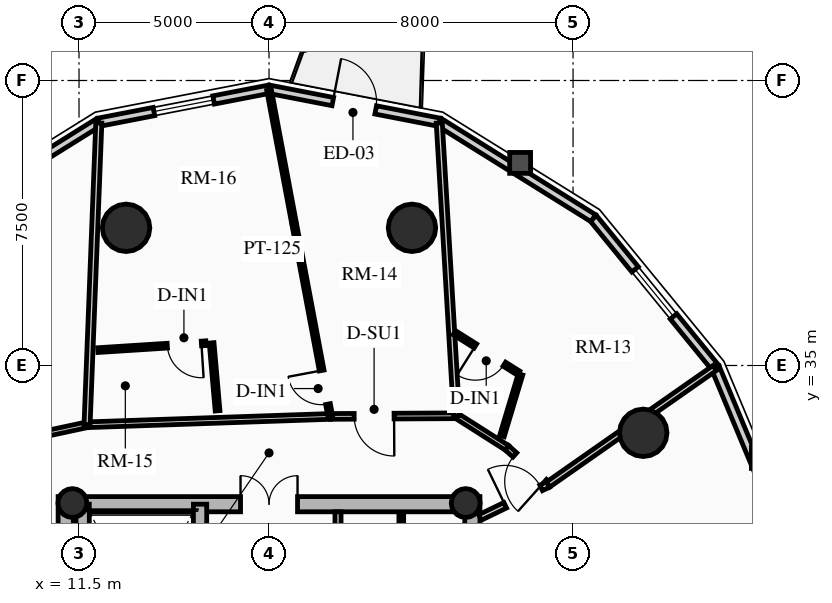
"""IFC4 building model, lengths in metres.
Left out: names, types, materials, properties, quantities, classifications, styles, units other than length and angle.
Written with IfcOpenShell. Run it as: python <this file> out.ifc"""

import sys

from ifc_helpers import new_model, si_unit, direction, frame, frame_2d, origin, origin_2d, place, context, subcontext, project, spatial, rectangle, circle, hollow_circle, extrude, source, transform, mapped, element, fill, save


model = new_model("IFC4")
c1 = context("Model", 3, precision=1e-05, world=origin(), true_north=direction((0.0, 1.0)))
c2 = subcontext(c1, "Body", "Model", "MODEL_VIEW")
j1 = project(units=[si_unit("LENGTHUNIT", "METRE"), si_unit("PLANEANGLEUNIT", "RADIAN")], contexts=[c1])
p1 = place(None, origin())
s1 = spatial("IfcSite", under=j1, at=p1, CompositionType="ELEMENT")
p2 = place(p1, origin())
s2 = spatial("IfcBuilding", under=s1, at=p2, CompositionType="ELEMENT")
p3 = place(p2, frame((0.0, 0.0, 154.51)))
s3 = spatial("IfcBuildingStorey", under=s2, at=p3, CompositionType="ELEMENT", Elevation=154.51)
for number, where, z_axis, x_axis in (
    (1, (11.15, 17.45, 0.0), (0.0, 0.0, 1.0), (0.0, 1.0, 0.0)),
    (2, (21.85, 17.45, 0.0), (0.0, 0.0, 1.0), (0.0, 1.0, 0.0)),
):
    element("IfcWall", number, at=place(p3, frame(where, z_axis=z_axis, x_axis=x_axis)), inside=s3, PredefinedType="SHEAR", context=c2, shape_type="SweptSolid", body=[
        extrude(rectangle(XDim=14.1, YDim=0.4, at=frame_2d((7.05, 0.0))), origin(), (0.0, 0.0, 1.0), 2.91),
    ])
p4 = place(p3, frame((11.15, 31.35, 0.0), z_axis=(0.0, 0.0, 1.0), x_axis=(1.0, 0.0, 0.0)))
e3 = element("IfcWall", 3, at=p4, inside=s3, PredefinedType="SHEAR", context=c2, shape_type="SweptSolid", body=[
    extrude(rectangle(XDim=10.7, YDim=0.4, at=frame_2d((5.35, 0.0))), origin(), (0.0, 0.0, 1.0), 2.91),
])
m1 = source(origin(), c2, "Body", "SweptSolid", [
    extrude(rectangle(XDim=1.5, YDim=2.02, at=frame_2d((0.75, 1.01))), frame((0.0, 0.21, 0.0), z_axis=(0.0, -1.0, 0.0), x_axis=(1.0, 0.0, 0.0)), (0.0, 0.0, 1.0), 0.42),
])
p5 = place(p4, frame((4.6, 0.0, 0.0)))
e4 = element("IfcOpeningElement", 4, at=p5, cuts=e3, PredefinedType="OPENING", context=c2, shape_type="MappedRepresentation", body=[
    mapped(m1, transform((0.0, 0.0, 0.0), x_axis=(1.0, 0.0, 0.0), y_axis=(0.0, 1.0, 0.0), z_axis=(0.0, 0.0, 1.0), scale=1.0)),
])
p6 = place(p3, frame((14.685, 17.65, 0.0), z_axis=(0.0, 0.0, 1.0), x_axis=(0.0, 1.0, 0.0)))
e5 = element("IfcWall", 5, at=p6, inside=s3, PredefinedType="SHEAR", context=c2, shape_type="SweptSolid", body=[
    extrude(rectangle(XDim=13.7, YDim=0.35, at=frame_2d((6.85, 0.0))), origin(), (0.0, 0.0, 1.0), 2.91),
])
m2 = source(origin(), c2, "Body", "SweptSolid", [
    extrude(rectangle(XDim=1.1, YDim=2.015, at=frame_2d((0.55, 1.007))), frame((0.0, 0.185, 0.0), z_axis=(0.0, -1.0, 0.0), x_axis=(1.0, 0.0, 0.0)), (0.0, 0.0, 1.0), 0.37),
])
p7 = place(p6, frame((4.85, 0.0, 0.0)))
e6 = element("IfcOpeningElement", 6, at=p7, cuts=e5, PredefinedType="OPENING", context=c2, shape_type="MappedRepresentation", body=[
    mapped(m2, transform((0.0, 0.0, 0.0), x_axis=(1.0, 0.0, 0.0), y_axis=(0.0, 1.0, 0.0), z_axis=(0.0, 0.0, 1.0), scale=1.0)),
])
p8 = place(p6, frame((0.625, 0.0, 0.0)))
e7 = element("IfcOpeningElement", 7, at=p8, cuts=e5, PredefinedType="OPENING", context=c2, shape_type="MappedRepresentation", body=[
    mapped(m2, transform((0.0, 0.0, 0.0), x_axis=(1.0, 0.0, 0.0), y_axis=(0.0, 1.0, 0.0), z_axis=(0.0, 0.0, 1.0), scale=1.0)),
])
p9 = place(p6, frame((2.625, 0.0, 0.0)))
e8 = element("IfcOpeningElement", 8, at=p9, cuts=e5, PredefinedType="OPENING", context=c2, shape_type="MappedRepresentation", body=[
    mapped(m2, transform((0.0, 0.0, 0.0), x_axis=(1.0, 0.0, 0.0), y_axis=(0.0, 1.0, 0.0), z_axis=(0.0, 0.0, 1.0), scale=1.0)),
])
m3 = source(origin(), c2, "Body", "SweptSolid", [
    extrude(rectangle(XDim=1.15, YDim=2.02, at=frame_2d((0.575, 1.01))), frame((0.0, 0.185, 0.0), z_axis=(0.0, -1.0, 0.0), x_axis=(1.0, 0.0, 0.0)), (0.0, 0.0, 1.0), 0.37),
])
p10 = place(p6, frame((7.27, 0.0, 0.0)))
e9 = element("IfcOpeningElement", 9, at=p10, cuts=e5, PredefinedType="OPENING", context=c2, shape_type="MappedRepresentation", body=[
    mapped(m3, transform((0.0, 0.0, 0.0), x_axis=(1.0, 0.0, 0.0), y_axis=(0.0, 1.0, 0.0), z_axis=(0.0, 0.0, 1.0), scale=1.0)),
])
p11 = place(p3, frame((11.595, 24.655, 0.0), z_axis=(0.0, 0.0, 1.0), x_axis=(0.0, 1.0, 0.0)))
e10 = element("IfcWall", 10, at=p11, inside=s3, PredefinedType="SHEAR", context=c2, shape_type="SweptSolid", body=[
    extrude(rectangle(XDim=6.695, YDim=0.35, at=frame_2d((3.348, 0.0))), origin(), (0.0, 0.0, 1.0), 2.91),
])
for number, where, z_axis, x_axis in (
    (11, (11.325, 31.38, 0.0), (0.0, 0.0, 1.0), (1.0, 0.0, 0.0)),
    (12, (21.675, 31.38, 0.0), (0.0, 0.0, 1.0), (1.0, 0.0, 0.0)),
):
    element("IfcColumn", number, at=place(p3, frame(where, z_axis=z_axis, x_axis=x_axis)), inside=s3, PredefinedType="COLUMN", context=c2, shape_type="SweptSolid", body=[
        extrude(hollow_circle(Radius=0.38, WallThickness=0.032, at=origin_2d()), origin(), (0.0, 0.0, 1.0), 2.91),
    ])
for number, where, z_axis, x_axis in (
    (13, (26.347, 33.229, 0.0), (0.0, 0.0, 1.0), (1.0, 0.0, 0.0)),
    (14, (20.261, 38.623, 0.0), (0.0, 0.0, 1.0), (1.0, 0.0, 0.0)),
    (15, (12.739, 38.623, 0.0), (0.0, 0.0, 1.0), (1.0, 0.0, 0.0)),
):
    element("IfcColumn", number, at=place(p3, frame(where, z_axis=z_axis, x_axis=x_axis)), inside=s3, PredefinedType="USERDEFINED", context=c2, shape_type="SweptSolid", body=[
        extrude(circle(Radius=0.625, at=origin_2d()), origin(), (0.0, 0.0, 1.0), 2.91),
    ])
p12 = place(p3, frame((28.243, 34.945, 0.0), z_axis=(0.0, 0.0, 1.0), x_axis=(0.384259959969, -0.923224936386, 0.0)))
e16 = element("IfcWall", 16, at=p12, inside=s3, PredefinedType="SOLIDWALL", context=c2, shape_type="SweptSolid", body=[
    extrude(rectangle(XDim=5.365, YDim=0.22, at=frame_2d((2.683, 0.0))), origin(), (0.0, 0.0, 1.0), 2.245),
])
p13 = place(p3, frame((25.032, 38.876, 0.0), z_axis=(0.0, 0.0, 1.0), x_axis=(0.632598524901, -0.774479894053, 0.0)))
e17 = element("IfcWall", 17, at=p13, inside=s3, PredefinedType="SOLIDWALL", context=c2, shape_type="SweptSolid", body=[
    extrude(rectangle(XDim=5.076, YDim=0.22, at=frame_2d((2.538, 0.0))), origin(), (0.0, 0.0, 1.0), 2.245),
])
m4 = source(origin(), c2, "Body", "SweptSolid", [
    extrude(rectangle(XDim=1.6, YDim=1.3, at=frame_2d((0.8, 0.65))), frame((0.0, 0.12, 0.0), z_axis=(0.0, -1.0, 0.0), x_axis=(1.0, 0.0, 0.0)), (0.0, 0.0, 1.0), 0.24),
])
p14 = place(p13, frame((1.738, 0.0, 0.65)))
e18 = element("IfcOpeningElement", 18, at=p14, cuts=e17, PredefinedType="OPENING", context=c2, shape_type="MappedRepresentation", body=[
    mapped(m4, transform((0.0, 0.0, 0.0), x_axis=(1.0, 0.0, 0.0), y_axis=(0.0, 1.0, 0.0), z_axis=(0.0, 0.0, 1.0), scale=1.0)),
])
p15 = place(p3, frame((20.985, 41.4, 0.0), z_axis=(0.0, 0.0, 1.0), x_axis=(0.848452391194, -0.529271707044, 0.0)))
e19 = element("IfcWall", 19, at=p15, inside=s3, PredefinedType="SOLIDWALL", context=c2, shape_type="SweptSolid", body=[
    extrude(rectangle(XDim=4.769, YDim=0.22, at=frame_2d((2.385, 0.0))), origin(), (0.0, 0.0, 1.0), 2.245),
])
p16 = place(p3, frame((16.5, 42.27, 0.0), z_axis=(0.0, 0.0, 1.0), x_axis=(0.981718699963, -0.190337579429, 0.0)))
e20 = element("IfcWall", 20, at=p16, inside=s3, PredefinedType="SOLIDWALL", context=c2, shape_type="SweptSolid", body=[
    extrude(rectangle(XDim=4.569, YDim=0.22, at=frame_2d((2.284, 0.0))), origin(), (0.0, 0.0, 1.0), 2.245),
])
m5 = source(origin(), c2, "Body", "SweptSolid", [
    extrude(rectangle(XDim=1.15, YDim=2.005, at=frame_2d((0.575, 1.002))), frame((0.0, 0.12, 0.0), z_axis=(0.0, -1.0, 0.0), x_axis=(1.0, 0.0, 0.0)), (0.0, 0.0, 1.0), 0.24),
])
p17 = place(p16, frame((1.709, 0.0, 0.0)))
e21 = element("IfcOpeningElement", 21, at=p17, cuts=e20, PredefinedType="OPENING", context=c2, shape_type="MappedRepresentation", body=[
    mapped(m5, transform((0.0, 0.0, 0.0), x_axis=(1.0, 0.0, 0.0), y_axis=(0.0, 1.0, 0.0), z_axis=(0.0, 0.0, 1.0), scale=1.0)),
])
p18 = place(p3, frame((12.015, 41.4, 0.0), z_axis=(0.0, 0.0, 1.0), x_axis=(0.981718699963, 0.190337579429, 0.0)))
e22 = element("IfcWall", 22, at=p18, inside=s3, PredefinedType="SOLIDWALL", context=c2, shape_type="SweptSolid", body=[
    extrude(rectangle(XDim=4.569, YDim=0.22, at=frame_2d((2.284, 0.0))), origin(), (0.0, 0.0, 1.0), 2.245),
])
p19 = place(p18, frame((1.484, 0.0, 0.65)))
e23 = element("IfcOpeningElement", 23, at=p19, cuts=e22, PredefinedType="OPENING", context=c2, shape_type="MappedRepresentation", body=[
    mapped(m4, transform((0.0, 0.0, 0.0), x_axis=(1.0, 0.0, 0.0), y_axis=(0.0, 1.0, 0.0), z_axis=(0.0, 0.0, 1.0), scale=1.0)),
])
p20 = place(p3, frame((7.968, 38.876, 0.0), z_axis=(0.0, 0.0, 1.0), x_axis=(0.848452391194, 0.529271707044, 0.0)))
e24 = element("IfcWall", 24, at=p20, inside=s3, PredefinedType="SOLIDWALL", context=c2, shape_type="SweptSolid", body=[
    extrude(rectangle(XDim=4.769, YDim=0.22, at=frame_2d((2.385, 0.0))), origin(), (0.0, 0.0, 1.0), 2.245),
])
p21 = place(p3, frame((18.315, 27.25, 0.0), z_axis=(0.0, 0.0, 1.0), x_axis=(0.0, 1.0, 0.0)))
e25 = element("IfcWall", 25, at=p21, inside=s3, PredefinedType="PARTITIONING", context=c2, shape_type="SweptSolid", body=[
    extrude(rectangle(XDim=3.9, YDim=0.16, at=frame_2d((1.95, 0.0))), origin(), (0.0, 0.0, 1.0), 2.675),
])
m6 = source(origin(), c2, "Body", "SweptSolid", [
    extrude(rectangle(XDim=0.9, YDim=2.005, at=frame_2d((0.45, 1.002))), frame((0.0, 0.09, 0.0), z_axis=(0.0, -1.0, 0.0), x_axis=(1.0, 0.0, 0.0)), (0.0, 0.0, 1.0), 0.18),
])
p22 = place(p21, frame((2.2, 0.0, 0.0)))
e26 = element("IfcOpeningElement", 26, at=p22, cuts=e25, PredefinedType="OPENING", context=c2, shape_type="MappedRepresentation", body=[
    mapped(m6, transform((0.0, 0.0, 0.0), x_axis=(1.0, 0.0, 0.0), y_axis=(0.0, 1.0, 0.0), z_axis=(0.0, 0.0, 1.0), scale=1.0)),
])
p23 = place(p3, frame((19.98, 27.3, 0.0), z_axis=(0.0, 0.0, 1.0), x_axis=(0.0, 1.0, 0.0)))
e27 = element("IfcWall", 27, at=p23, inside=s3, PredefinedType="PARTITIONING", context=c2, shape_type="SweptSolid", body=[
    extrude(rectangle(XDim=3.82, YDim=0.125, at=frame_2d((1.91, 0.0))), origin(), (0.0, 0.0, 1.0), 2.675),
])
m7 = source(origin(), c2, "Body", "SweptSolid", [
    extrude(rectangle(XDim=0.9, YDim=2.005, at=frame_2d((0.45, 1.002))), frame((0.0, 0.073, 0.0), z_axis=(0.0, -1.0, 0.0), x_axis=(1.0, 0.0, 0.0)), (0.0, 0.0, 1.0), 0.145),
])
p24 = place(p23, frame((1.45, 0.0, 0.0)))
e28 = element("IfcOpeningElement", 28, at=p24, cuts=e27, PredefinedType="OPENING", context=c2, shape_type="MappedRepresentation", body=[
    mapped(m7, transform((0.0, 0.0, 0.0), x_axis=(1.0, 0.0, 0.0), y_axis=(0.0, 1.0, 0.0), z_axis=(0.0, 0.0, 1.0), scale=1.0)),
])
p25 = place(p3, frame((23.841, 31.866, 0.0), z_axis=(0.0, 0.0, 1.0), x_axis=(-0.74511843306, 0.666932171, 0.0)))
e29 = element("IfcWall", 29, at=p25, inside=s3, PredefinedType="PARTITIONING", context=c2, shape_type="SweptSolid", body=[
    extrude(rectangle(XDim=1.455, YDim=0.15, at=frame_2d((0.728, 0.0))), origin(), (0.0, 0.0, 1.0), 2.245),
])
m8 = source(origin(), c2, "Body", "SweptSolid", [
    extrude(rectangle(XDim=1.05, YDim=2.015, at=frame_2d((0.525, 1.007))), frame((0.0, 0.085, 0.0), z_axis=(0.0, -1.0, 0.0), x_axis=(1.0, 0.0, 0.0)), (0.0, 0.0, 1.0), 0.17),
])
p26 = place(p25, frame((0.12, 0.0, 0.0)))
e30 = element("IfcOpeningElement", 30, at=p26, cuts=e29, PredefinedType="OPENING", context=c2, shape_type="MappedRepresentation", body=[
    mapped(m8, transform((0.0, 0.0, 0.0), x_axis=(1.0, 0.0, 0.0), y_axis=(0.0, 1.0, 0.0), z_axis=(0.0, 0.0, 1.0), scale=1.0)),
])
p27 = place(p3, frame((22.756, 32.836, 0.0), z_axis=(0.0, 0.0, 1.0), x_axis=(-0.843828401801, 0.536613108593, 0.0)))
e31 = element("IfcWall", 31, at=p27, inside=s3, PredefinedType="PARTITIONING", context=c2, shape_type="SweptSolid", body=[
    extrude(rectangle(XDim=1.565, YDim=0.15, at=frame_2d((0.783, 0.0))), origin(), (0.0, 0.0, 1.0), 2.245),
])
p28 = place(p3, frame((21.435, 33.677, 0.0), z_axis=(0.0, 0.0, 1.0), x_axis=(-0.999986775557, -0.005142831114, 0.0)))
e32 = element("IfcWall", 32, at=p28, inside=s3, PredefinedType="PARTITIONING", context=c2, shape_type="SweptSolid", body=[
    extrude(rectangle(XDim=3.323, YDim=0.15, at=frame_2d((1.662, 0.0))), origin(), (0.0, 0.0, 1.0), 2.245),
])
p29 = place(p28, frame((1.645, 0.0, 0.0)))
e33 = element("IfcOpeningElement", 33, at=p29, cuts=e32, PredefinedType="OPENING", context=c2, shape_type="MappedRepresentation", body=[
    mapped(m8, transform((0.0, 0.0, 0.0), x_axis=(1.0, 0.0, 0.0), y_axis=(0.0, 1.0, 0.0), z_axis=(0.0, 0.0, 1.0), scale=1.0)),
])
p30 = place(p3, frame((18.112, 33.659, 0.0), z_axis=(0.0, 0.0, 1.0), x_axis=(-0.999413895918, -0.034232508622, 0.0)))
e34 = element("IfcWall", 34, at=p30, inside=s3, PredefinedType="PARTITIONING", context=c2, shape_type="SweptSolid", body=[
    extrude(rectangle(XDim=6.404, YDim=0.15, at=frame_2d((3.202, 0.0))), origin(), (0.0, 0.0, 1.0), 2.245),
])
p31 = place(p3, frame((11.712, 33.44, 0.0), z_axis=(0.0, 0.0, 1.0), x_axis=(-0.977753514213, -0.209757158265, 0.0)))
e35 = element("IfcWall", 35, at=p31, inside=s3, PredefinedType="PARTITIONING", context=c2, shape_type="SweptSolid", body=[
    extrude(rectangle(XDim=1.901, YDim=0.15, at=frame_2d((0.95, 0.0))), origin(), (0.0, 0.0, 1.0), 2.245),
])
p32 = place(p3, frame((23.841, 31.866, 0.0), z_axis=(0.0, 0.0, 1.0), x_axis=(0.819514693563, 0.573058170724, 0.0)))
e36 = element("IfcWall", 36, at=p32, inside=s3, PredefinedType="PARTITIONING", context=c2, shape_type="SweptSolid", body=[
    extrude(rectangle(XDim=5.352, YDim=0.16, at=frame_2d((2.676, 0.0))), origin(), (0.0, 0.0, 1.0), 2.245),
])
p33 = place(p3, frame((21.435, 33.677, 0.0), z_axis=(0.0, 0.0, 1.0), x_axis=(-0.059087305226, 0.99825281886, 0.0)))
e37 = element("IfcWall", 37, at=p33, inside=s3, PredefinedType="PARTITIONING", context=c2, shape_type="SweptSolid", body=[
    extrude(rectangle(XDim=7.718, YDim=0.16, at=frame_2d((3.859, 0.0))), origin(), (0.0, 0.0, 1.0), 2.245),
])
p34 = place(p3, frame((11.712, 33.44, 0.0), z_axis=(0.0, 0.0, 1.0), x_axis=(0.038892064024, 0.999243417469, 0.0)))
e38 = element("IfcWall", 38, at=p34, inside=s3, PredefinedType="PARTITIONING", context=c2, shape_type="SweptSolid", body=[
    extrude(rectangle(XDim=7.947, YDim=0.16, at=frame_2d((3.974, 0.0))), origin(), (0.0, 0.0, 1.0), 2.245),
])
p35 = place(p3, frame((22.05, 31.0, 0.0), z_axis=(0.0, 0.0, 1.0), x_axis=(0.900241516545, 0.435390872537, 0.0)))
e39 = element("IfcWall", 39, at=p35, inside=s3, PredefinedType="PARTITIONING", context=c2, shape_type="SweptSolid", body=[
    extrude(rectangle(XDim=1.989, YDim=0.16, at=frame_2d((0.995, 0.0))), origin(), (0.0, 0.0, 1.0), 2.245),
])
m9 = source(origin(), c2, "Body", "SweptSolid", [
    extrude(rectangle(XDim=1.05, YDim=2.015, at=frame_2d((0.525, 1.007))), frame((0.0, 0.09, 0.0), z_axis=(0.0, -1.0, 0.0), x_axis=(1.0, 0.0, 0.0)), (0.0, 0.0, 1.0), 0.18),
])
p36 = place(p35, frame((0.739, 0.0, 0.0)))
e40 = element("IfcOpeningElement", 40, at=p36, cuts=e39, PredefinedType="OPENING", context=c2, shape_type="MappedRepresentation", body=[
    mapped(m9, transform((0.0, 0.0, 0.0), x_axis=(1.0, 0.0, 0.0), y_axis=(0.0, 1.0, 0.0), z_axis=(0.0, 0.0, 1.0), scale=1.0)),
])
p37 = place(p3, frame((22.628, 33.142, 0.0), z_axis=(0.0, 0.0, 1.0), x_axis=(0.28808673097, 0.957604320917, 0.0)))
e41 = element("IfcWall", 41, at=p37, inside=s3, PredefinedType="PARTITIONING", context=c2, shape_type="SweptSolid", body=[
    extrude(rectangle(XDim=1.698, YDim=0.125, at=frame_2d((0.849, 0.0))), origin(), (0.0, 0.0, 1.0), 2.245),
])
p38 = place(p3, frame((23.064, 34.801, 0.0), z_axis=(0.0, 0.0, 1.0), x_axis=(-0.846418905871, 0.532517638942, 0.0)))
e42 = element("IfcWall", 42, at=p38, inside=s3, PredefinedType="PARTITIONING", context=c2, shape_type="SweptSolid", body=[
    extrude(rectangle(XDim=1.993, YDim=0.125, at=frame_2d((0.997, 0.0))), origin(), (0.0, 0.0, 1.0), 2.675),
])
p39 = place(p38, frame((0.44, 0.0, 0.0)))
e43 = element("IfcOpeningElement", 43, at=p39, cuts=e42, PredefinedType="OPENING", context=c2, shape_type="MappedRepresentation", body=[
    mapped(m7, transform((0.0, 0.0, 0.0), x_axis=(1.0, 0.0, 0.0), y_axis=(0.0, 1.0, 0.0), z_axis=(0.0, 0.0, 1.0), scale=1.0)),
])
p40 = place(p3, frame((18.112, 33.659, 0.0), z_axis=(0.0, 0.0, 1.0), x_axis=(-0.18446223694, 0.982839601941, 0.0)))
e44 = element("IfcWall", 44, at=p40, inside=s3, PredefinedType="PARTITIONING", context=c2, shape_type="SweptSolid", body=[
    extrude(rectangle(XDim=8.74, YDim=0.125, at=frame_2d((4.37, 0.0))), origin(), (0.0, 0.0, 1.0), 2.245),
])
p41 = place(p40, frame((0.33, 0.0, 0.0)))
e45 = element("IfcOpeningElement", 45, at=p41, cuts=e44, PredefinedType="OPENING", context=c2, shape_type="MappedRepresentation", body=[
    mapped(m7, transform((0.0, 0.0, 0.0), x_axis=(1.0, 0.0, 0.0), y_axis=(0.0, 1.0, 0.0), z_axis=(0.0, 0.0, 1.0), scale=1.0)),
])
p42 = place(p3, frame((15.146, 33.807, 0.0), z_axis=(0.0, 0.0, 1.0), x_axis=(-0.087433462003, 0.996170361797, 0.0)))
e46 = element("IfcWall", 46, at=p42, inside=s3, PredefinedType="PARTITIONING", context=c2, shape_type="SweptSolid", body=[
    extrude(rectangle(XDim=1.795, YDim=0.125, at=frame_2d((0.898, 0.0))), origin(), (0.0, 0.0, 1.0), 2.675),
])
p43 = place(p3, frame((14.841, 35.586, 0.0), z_axis=(0.0, 0.0, 1.0), x_axis=(-0.997963636416, -0.063785424599, 0.0)))
e47 = element("IfcWall", 47, at=p43, inside=s3, PredefinedType="PARTITIONING", context=c2, shape_type="SweptSolid", body=[
    extrude(rectangle(XDim=2.852, YDim=0.125, at=frame_2d((1.426, 0.0))), origin(), (0.0, 0.0, 1.0), 2.245),
])
p44 = place(p43, frame((0.12, 0.0, 0.0)))
e48 = element("IfcOpeningElement", 48, at=p44, cuts=e47, PredefinedType="OPENING", context=c2, shape_type="MappedRepresentation", body=[
    mapped(m7, transform((0.0, 0.0, 0.0), x_axis=(1.0, 0.0, 0.0), y_axis=(0.0, 1.0, 0.0), z_axis=(0.0, 0.0, 1.0), scale=1.0)),
])
m10 = source(origin(), c2, "Body", "SweptSolid", [
    extrude(rectangle(XDim=1.6, YDim=1.3, at=frame_2d((0.8, 0.65))), frame((0.0, 0.03, 0.0), z_axis=(0.0, -1.0, 0.0), x_axis=(1.0, 0.0, 0.0)), (0.0, 0.0, 1.0), 0.06),
])
p45 = place(p14, origin())
e49 = element("IfcWindow", 49, at=p45, inside=s3, PartitioningType="SINGLE_PANEL", PredefinedType="WINDOW", context=c2, shape_type="MappedRepresentation", body=[
    mapped(m10, transform((0.0, 0.0, 0.0), x_axis=(1.0, 0.0, 0.0), y_axis=(0.0, 1.0, 0.0), z_axis=(0.0, 0.0, 1.0), scale=1.0)),
])
fill(e18, e49)
m11 = source(origin(), c2, "Body", "SweptSolid", [
    extrude(rectangle(XDim=1.15, YDim=2.005, at=frame_2d((0.575, 1.002))), frame((0.0, 0.025, 0.0), z_axis=(0.0, -1.0, 0.0), x_axis=(1.0, 0.0, 0.0)), (0.0, 0.0, 1.0), 0.05),
])
p46 = place(p17, origin())
e50 = element("IfcDoor", 50, at=p46, inside=s3, OperationType="SINGLE_SWING_LEFT", PredefinedType="DOOR", context=c2, shape_type="MappedRepresentation", body=[
    mapped(m11, transform((0.0, 0.0, 0.0), x_axis=(1.0, 0.0, 0.0), y_axis=(0.0, 1.0, 0.0), z_axis=(0.0, 0.0, 1.0), scale=1.0)),
])
fill(e21, e50)
p47 = place(p19, origin())
e51 = element("IfcWindow", 51, at=p47, inside=s3, PartitioningType="SINGLE_PANEL", PredefinedType="WINDOW", context=c2, shape_type="MappedRepresentation", body=[
    mapped(m10, transform((0.0, 0.0, 0.0), x_axis=(1.0, 0.0, 0.0), y_axis=(0.0, 1.0, 0.0), z_axis=(0.0, 0.0, 1.0), scale=1.0)),
])
fill(e23, e51)
m12 = source(origin(), c2, "Body", "SweptSolid", [
    extrude(rectangle(XDim=1.5, YDim=2.02, at=frame_2d((0.75, 1.01))), frame((0.0, 0.025, 0.0), z_axis=(0.0, -1.0, 0.0), x_axis=(1.0, 0.0, 0.0)), (0.0, 0.0, 1.0), 0.05),
])
p48 = place(p5, origin())
e52 = element("IfcDoor", 52, at=p48, inside=s3, OperationType="DOUBLE_DOOR_SINGLE_SWING", PredefinedType="DOOR", context=c2, shape_type="MappedRepresentation", body=[
    mapped(m12, transform((0.0, 0.0, 0.0), x_axis=(1.0, 0.0, 0.0), y_axis=(0.0, 1.0, 0.0), z_axis=(0.0, 0.0, 1.0), scale=1.0)),
])
fill(e4, e52)
m13 = source(origin(), c2, "Body", "SweptSolid", [
    extrude(rectangle(XDim=1.05, YDim=2.015, at=frame_2d((0.525, 1.007))), frame((0.0, 0.025, 0.0), z_axis=(0.0, -1.0, 0.0), x_axis=(1.0, 0.0, 0.0)), (0.0, 0.0, 1.0), 0.05),
])
p49 = place(p36, origin())
e53 = element("IfcDoor", 53, at=p49, inside=s3, OperationType="SINGLE_SWING_LEFT", PredefinedType="DOOR", context=c2, shape_type="MappedRepresentation", body=[
    mapped(m13, transform((0.0, 0.0, 0.0), x_axis=(1.0, 0.0, 0.0), y_axis=(0.0, 1.0, 0.0), z_axis=(0.0, 0.0, 1.0), scale=1.0)),
])
fill(e40, e53)
p50 = place(p26, origin())
e54 = element("IfcDoor", 54, at=p50, inside=s3, OperationType="SINGLE_SWING_LEFT", PredefinedType="DOOR", context=c2, shape_type="MappedRepresentation", body=[
    mapped(m13, transform((0.0, 0.0, 0.0), x_axis=(1.0, 0.0, 0.0), y_axis=(0.0, 1.0, 0.0), z_axis=(0.0, 0.0, 1.0), scale=1.0)),
])
fill(e30, e54)
m14 = source(origin(), c2, "Body", "SweptSolid", [
    extrude(rectangle(XDim=0.9, YDim=2.005, at=frame_2d((0.45, 1.002))), frame((0.0, 0.025, 0.0), z_axis=(0.0, -1.0, 0.0), x_axis=(1.0, 0.0, 0.0)), (0.0, 0.0, 1.0), 0.05),
])
p51 = place(p39, origin())
e55 = element("IfcDoor", 55, at=p51, inside=s3, OperationType="SINGLE_SWING_RIGHT", PredefinedType="DOOR", context=c2, shape_type="MappedRepresentation", body=[
    mapped(m14, transform((0.0, 0.0, 0.0), x_axis=(1.0, 0.0, 0.0), y_axis=(0.0, 1.0, 0.0), z_axis=(0.0, 0.0, 1.0), scale=1.0)),
])
fill(e43, e55)
p52 = place(p29, origin())
e56 = element("IfcDoor", 56, at=p52, inside=s3, OperationType="SINGLE_SWING_LEFT", PredefinedType="DOOR", context=c2, shape_type="MappedRepresentation", body=[
    mapped(m13, transform((0.0, 0.0, 0.0), x_axis=(1.0, 0.0, 0.0), y_axis=(0.0, 1.0, 0.0), z_axis=(0.0, 0.0, 1.0), scale=1.0)),
])
fill(e33, e56)
p53 = place(p41, origin())
e57 = element("IfcDoor", 57, at=p53, inside=s3, OperationType="SINGLE_SWING_RIGHT", PredefinedType="DOOR", context=c2, shape_type="MappedRepresentation", body=[
    mapped(m14, transform((0.0, 0.0, 0.0), x_axis=(1.0, 0.0, 0.0), y_axis=(0.0, 1.0, 0.0), z_axis=(0.0, 0.0, 1.0), scale=1.0)),
])
fill(e45, e57)
p54 = place(p44, origin())
e58 = element("IfcDoor", 58, at=p54, inside=s3, OperationType="SINGLE_SWING_LEFT", PredefinedType="DOOR", context=c2, shape_type="MappedRepresentation", body=[
    mapped(m14, transform((0.0, 0.0, 0.0), x_axis=(1.0, 0.0, 0.0), y_axis=(0.0, 1.0, 0.0), z_axis=(0.0, 0.0, 1.0), scale=1.0)),
])
fill(e48, e58)
save(model, sys.argv[1])
